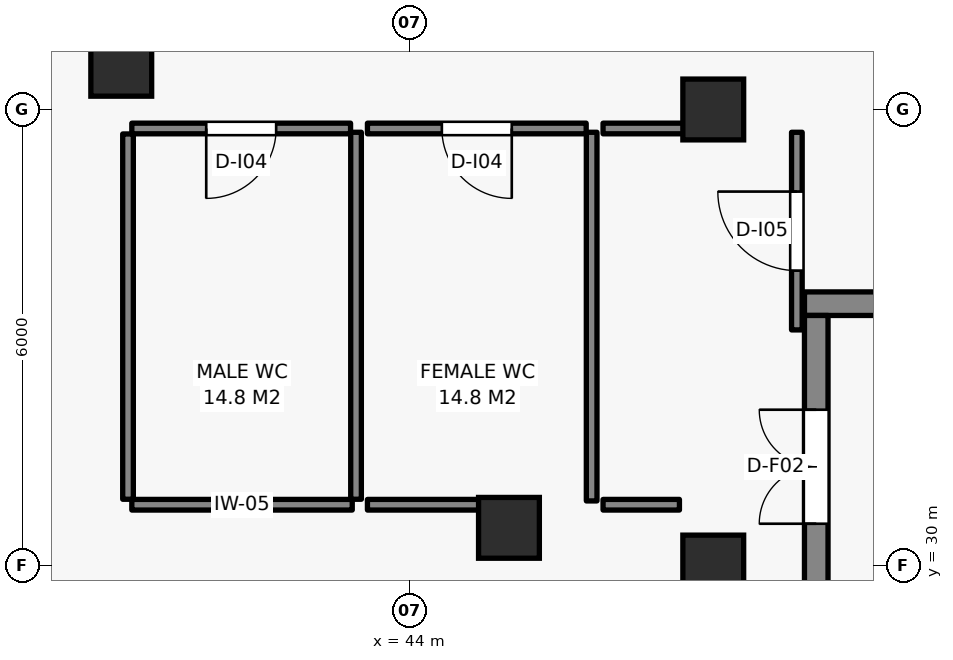
"""IFC4 building model, lengths in metres.
Left out: names, types, materials, properties, quantities, classifications, styles, units other than length and angle.
Written with IfcOpenShell. Run it as: python <this file> out.ifc"""

import sys

from ifc_helpers import new_model, si_unit, direction, frame, frame_2d, origin, origin_2d, place, context, subcontext, project, spatial, rectangle, extrude, element, fill, save


model = new_model("IFC4")
c1 = context("Model", 3, precision=1e-05, world=origin(), true_north=direction((0.0, 1.0)))
c2 = subcontext(c1, "Body", "Model", "MODEL_VIEW")
j1 = project(units=[si_unit("LENGTHUNIT", "METRE"), si_unit("PLANEANGLEUNIT", "RADIAN")], contexts=[c1])
p1 = place(None, origin())
s1 = spatial("IfcSite", under=j1, at=p1, CompositionType="ELEMENT")
p2 = place(p1, origin())
s2 = spatial("IfcBuilding", under=s1, at=p2, CompositionType="ELEMENT")
p3 = place(p2, frame((0.0, 0.0, -7.2)))
s3 = spatial("IfcBuildingStorey", under=s2, at=p3, CompositionType="ELEMENT", Elevation=-7.2)
p4 = place(p3, frame((49.2, 33.445, 0.0), z_axis=(0.0, 0.0, 1.0), x_axis=(1.0, 0.0, 0.0)))
e1 = element("IfcWall", 1, at=p4, inside=s3, PredefinedType="SHEAR", context=c2, shape_type="SweptSolid", body=[
    extrude(rectangle(XDim=10.6, YDim=0.31, at=frame_2d((5.3, 0.0))), origin(), (0.0, 0.0, 1.0), 6.8),
])
p5 = place(p3, frame((49.355, 29.31, 0.0), z_axis=(0.0, 0.0, 1.0), x_axis=(0.0, 1.0, 0.0)))
e2 = element("IfcWall", 2, at=p5, inside=s3, PredefinedType="SHEAR", context=c2, shape_type="SweptSolid", body=[
    extrude(rectangle(XDim=3.98, YDim=0.31, at=frame_2d((1.99, 0.0))), origin(), (0.0, 0.0, 1.0), 6.8),
])
p6 = place(p5, frame((1.24, 0.0, 0.0)))
e3 = element("IfcOpeningElement", 3, at=p6, cuts=e2, PredefinedType="OPENING", context=c2, shape_type="SweptSolid", body=[
    extrude(rectangle(XDim=1.5, YDim=2.15, at=frame_2d((0.75, 1.075))), frame((0.0, 0.165, 0.0), z_axis=(0.0, -1.0, 0.0), x_axis=(1.0, 0.0, 0.0)), (0.0, 0.0, 1.0), 0.33),
])
for number, where, z_axis, x_axis in (
    (4, (48.0, 30.0, 0.0), (0.0, 0.0, 1.0), (1.0, 0.0, 0.0)),
    (5, (48.0, 36.0, 0.0), (0.0, 0.0, 1.0), (1.0, 0.0, 0.0)),
    (6, (40.211, 36.575, 0.0), (0.0, 0.0, 1.0), (1.0, 0.0, 0.0)),
    (7, (45.312, 30.496, 0.0), (0.0, 0.0, 1.0), (1.0, 0.0, 0.0)),
):
    element("IfcColumn", number, at=place(p3, frame(where, z_axis=z_axis, x_axis=x_axis)), inside=s3, PredefinedType="COLUMN", context=c2, shape_type="SweptSolid", body=[
        extrude(rectangle(XDim=0.8, YDim=0.8, at=origin_2d()), origin(), (0.0, 0.0, 1.0), 7.2),
    ])
p7 = place(p3, frame((40.35, 30.8, 0.0), z_axis=(0.0, 0.0, 1.0), x_axis=(1.0, 0.0, 0.0)))
e8 = element("IfcWall", 8, at=p7, inside=s3, PredefinedType="PARTITIONING", context=c2, shape_type="SweptSolid", body=[
    extrude(rectangle(XDim=2.9, YDim=0.14, at=frame_2d((1.45, 0.0))), origin(), (0.0, 0.0, 1.0), 6.78),
])
p8 = place(p3, frame((43.3, 30.872, 0.0), z_axis=(0.0, 0.0, 1.0), x_axis=(0.0, 1.0, 0.0)))
e9 = element("IfcWall", 9, at=p8, inside=s3, PredefinedType="PARTITIONING", context=c2, shape_type="SweptSolid", body=[
    extrude(rectangle(XDim=4.828, YDim=0.14, at=frame_2d((2.414, 0.0))), origin(), (0.0, 0.0, 1.0), 6.78),
])
p9 = place(p3, frame((43.228, 35.75, 0.0), z_axis=(0.0, 0.0, 1.0), x_axis=(-1.0, 0.0, 0.0)))
e10 = element("IfcWall", 10, at=p9, inside=s3, PredefinedType="PARTITIONING", context=c2, shape_type="SweptSolid", body=[
    extrude(rectangle(XDim=2.878, YDim=0.14, at=frame_2d((1.439, 0.0))), origin(), (0.0, 0.0, 1.0), 6.78),
])
p10 = place(p9, frame((0.979, 0.0, 0.0)))
e11 = element("IfcOpeningElement", 11, at=p10, cuts=e10, PredefinedType="OPENING", context=c2, shape_type="SweptSolid", body=[
    extrude(rectangle(XDim=0.92, YDim=2.08, at=frame_2d((0.46, 1.04))), frame((0.0, 0.08, 0.0), z_axis=(0.0, -1.0, 0.0), x_axis=(1.0, 0.0, 0.0)), (0.0, 0.0, 1.0), 0.16),
])
p11 = place(p3, frame((40.3, 35.678, 0.0), z_axis=(0.0, 0.0, 1.0), x_axis=(0.0, -1.0, 0.0)))
e12 = element("IfcWall", 12, at=p11, inside=s3, PredefinedType="PARTITIONING", context=c2, shape_type="SweptSolid", body=[
    extrude(rectangle(XDim=4.806, YDim=0.14, at=frame_2d((2.403, 0.0))), origin(), (0.0, 0.0, 1.0), 6.78),
])
p12 = place(p3, frame((43.45, 30.8, 0.0), z_axis=(0.0, 0.0, 1.0), x_axis=(1.0, 0.0, 0.0)))
e13 = element("IfcWall", 13, at=p12, inside=s3, PredefinedType="PARTITIONING", context=c2, shape_type="SweptSolid", body=[
    extrude(rectangle(XDim=1.6, YDim=0.14, at=frame_2d((0.8, 0.0))), origin(), (0.0, 0.0, 1.0), 6.78),
])
p13 = place(p3, frame((46.4, 30.85, 0.0), z_axis=(0.0, 0.0, 1.0), x_axis=(0.0, 1.0, 0.0)))
e14 = element("IfcWall", 14, at=p13, inside=s3, PredefinedType="PARTITIONING", context=c2, shape_type="SweptSolid", body=[
    extrude(rectangle(XDim=4.85, YDim=0.14, at=frame_2d((2.425, 0.0))), origin(), (0.0, 0.0, 1.0), 6.78),
])
p14 = place(p3, frame((46.328, 35.75, 0.0), z_axis=(0.0, 0.0, 1.0), x_axis=(-1.0, 0.0, 0.0)))
e15 = element("IfcWall", 15, at=p14, inside=s3, PredefinedType="PARTITIONING", context=c2, shape_type="SweptSolid", body=[
    extrude(rectangle(XDim=2.878, YDim=0.14, at=frame_2d((1.439, 0.0))), origin(), (0.0, 0.0, 1.0), 6.78),
])
p15 = place(p14, frame((0.979, 0.0, 0.0)))
e16 = element("IfcOpeningElement", 16, at=p15, cuts=e15, PredefinedType="OPENING", context=c2, shape_type="SweptSolid", body=[
    extrude(rectangle(XDim=0.92, YDim=2.08, at=frame_2d((0.46, 1.04))), frame((0.0, 0.08, 0.0), z_axis=(0.0, -1.0, 0.0), x_axis=(1.0, 0.0, 0.0)), (0.0, 0.0, 1.0), 0.16),
])
p16 = place(p3, frame((46.55, 30.8, 0.0), z_axis=(0.0, 0.0, 1.0), x_axis=(1.0, 0.0, 0.0)))
e17 = element("IfcWall", 17, at=p16, inside=s3, PredefinedType="PARTITIONING", context=c2, shape_type="SweptSolid", body=[
    extrude(rectangle(XDim=1.005, YDim=0.14, at=frame_2d((0.502, 0.0))), origin(), (0.0, 0.0, 1.0), 5.885),
])
p17 = place(p3, frame((49.1, 33.1, 0.0), z_axis=(0.0, 0.0, 1.0), x_axis=(0.0, 1.0, 0.0)))
e18 = element("IfcWall", 18, at=p17, inside=s3, PredefinedType="PARTITIONING", context=c2, shape_type="SweptSolid", body=[
    extrude(rectangle(XDim=2.6, YDim=0.14, at=frame_2d((1.3, 0.0))), origin(), (0.0, 0.0, 1.0), 5.785),
])
p18 = place(p17, frame((0.78, 0.0, 0.0)))
e19 = element("IfcOpeningElement", 19, at=p18, cuts=e18, PredefinedType="OPENING", context=c2, shape_type="SweptSolid", body=[
    extrude(rectangle(XDim=1.04, YDim=2.1, at=frame_2d((0.52, 1.05))), frame((0.0, 0.08, 0.0), z_axis=(0.0, -1.0, 0.0), x_axis=(1.0, 0.0, 0.0)), (0.0, 0.0, 1.0), 0.16),
])
p19 = place(p3, frame((47.93, 35.75, 0.0), z_axis=(0.0, 0.0, 1.0), x_axis=(-1.0, 0.0, 0.0)))
e20 = element("IfcWall", 20, at=p19, inside=s3, PredefinedType="PARTITIONING", context=c2, shape_type="SweptSolid", body=[
    extrude(rectangle(XDim=1.38, YDim=0.14, at=frame_2d((0.69, 0.0))), origin(), (0.0, 0.0, 1.0), 5.785),
])
p20 = place(p6, origin())
e21 = element("IfcDoor", 21, at=p20, inside=s3, OperationType="DOUBLE_DOOR_SINGLE_SWING", PredefinedType="DOOR", context=c2, shape_type="SweptSolid", body=[
    extrude(rectangle(XDim=1.5, YDim=2.15, at=frame_2d((0.75, 1.075))), frame((0.0, 0.025, 0.0), z_axis=(0.0, -1.0, 0.0), x_axis=(1.0, 0.0, 0.0)), (0.0, 0.0, 1.0), 0.05),
])
fill(e3, e21)
p21 = place(p10, origin())
e22 = element("IfcDoor", 22, at=p21, inside=s3, OperationType="SINGLE_SWING_RIGHT", PredefinedType="DOOR", context=c2, shape_type="SweptSolid", body=[
    extrude(rectangle(XDim=0.92, YDim=2.08, at=frame_2d((0.46, 1.04))), frame((0.0, 0.025, 0.0), z_axis=(0.0, -1.0, 0.0), x_axis=(1.0, 0.0, 0.0)), (0.0, 0.0, 1.0), 0.05),
])
fill(e11, e22)
p22 = place(p15, origin())
e23 = element("IfcDoor", 23, at=p22, inside=s3, OperationType="SINGLE_SWING_LEFT", PredefinedType="DOOR", context=c2, shape_type="SweptSolid", body=[
    extrude(rectangle(XDim=0.92, YDim=2.08, at=frame_2d((0.46, 1.04))), frame((0.0, 0.025, 0.0), z_axis=(0.0, -1.0, 0.0), x_axis=(1.0, 0.0, 0.0)), (0.0, 0.0, 1.0), 0.05),
])
fill(e16, e23)
p23 = place(p18, origin())
e24 = element("IfcDoor", 24, at=p23, inside=s3, OperationType="SINGLE_SWING_RIGHT", PredefinedType="DOOR", context=c2, shape_type="SweptSolid", body=[
    extrude(rectangle(XDim=1.04, YDim=2.1, at=frame_2d((0.52, 1.05))), frame((0.0, 0.025, 0.0), z_axis=(0.0, -1.0, 0.0), x_axis=(1.0, 0.0, 0.0)), (0.0, 0.0, 1.0), 0.05),
])
fill(e19, e24)
save(model, sys.argv[1])
